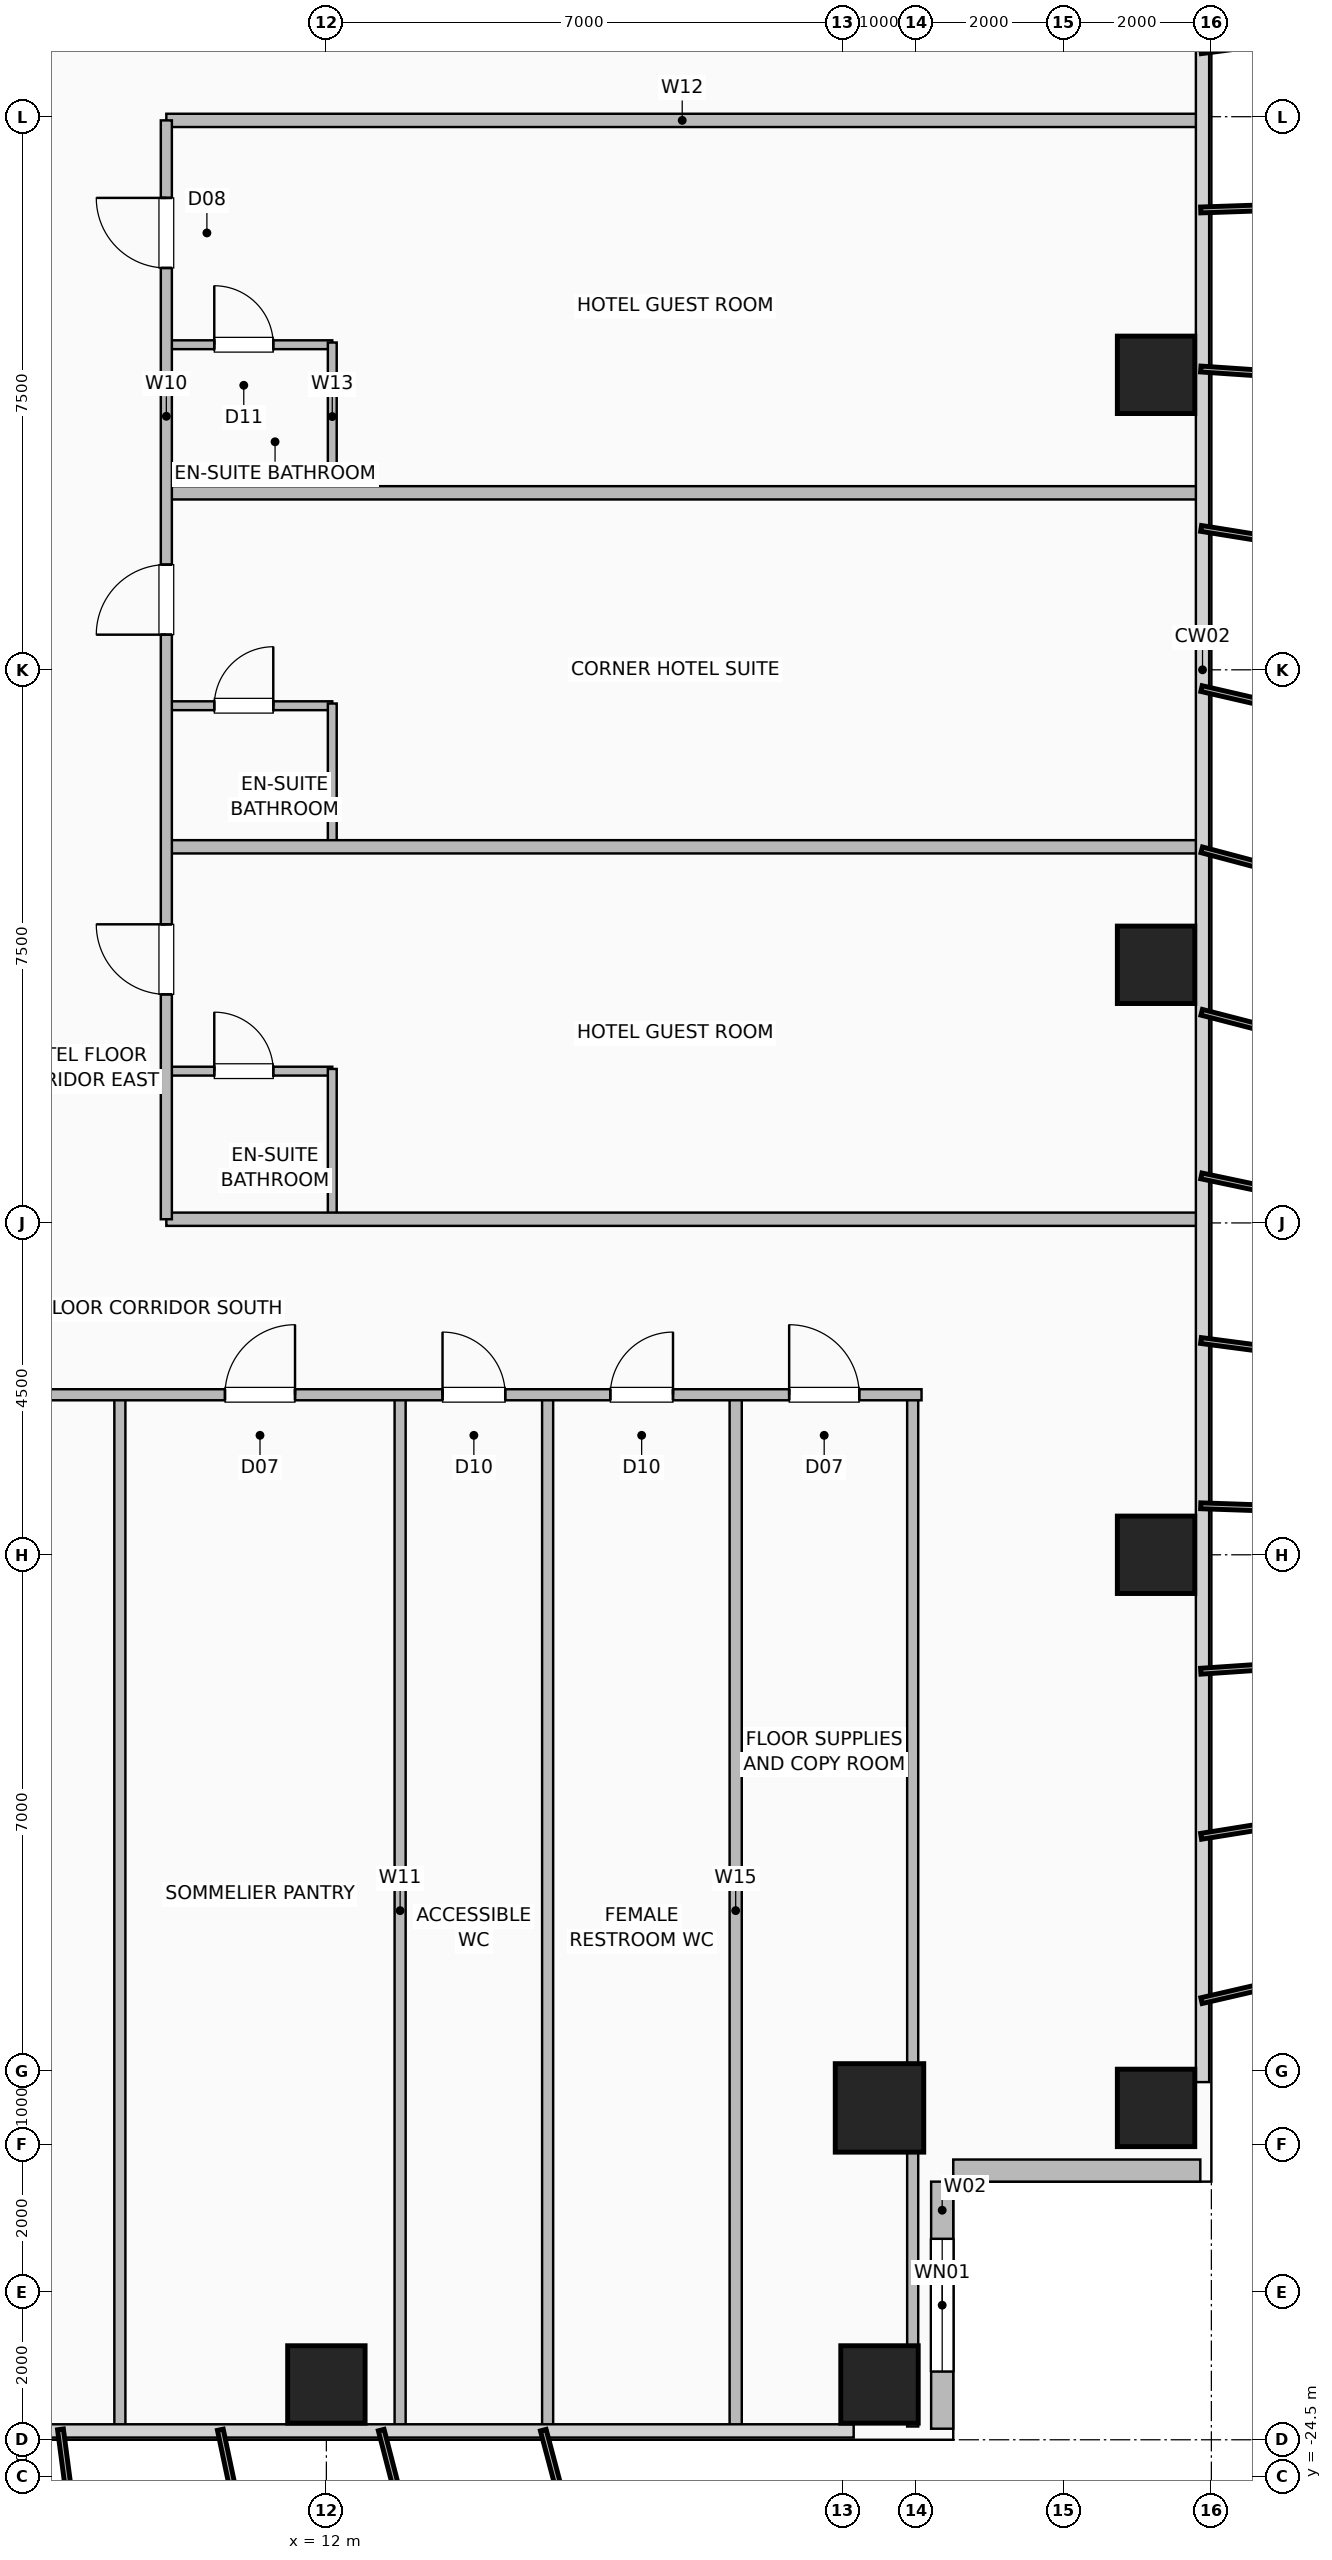
"""IFC4 building model, lengths in metres.
Left out: names, types, materials, properties, quantities, classifications, styles, units other than length and angle.
Written with IfcOpenShell. Run it as: python <this file> out.ifc"""

import sys

from ifc_helpers import new_model, si_unit, direction, frame, frame_2d, origin, origin_2d, place, context, subcontext, project, spatial, rectangle, hollow_rectangle, extrude, element, fill, save


model = new_model("IFC4")
c1 = context("Model", 3, precision=1e-05, world=origin(), true_north=direction((0.0, 1.0)))
c2 = subcontext(c1, "Body", "Model", "MODEL_VIEW")
j1 = project(units=[si_unit("LENGTHUNIT", "METRE"), si_unit("PLANEANGLEUNIT", "RADIAN")], contexts=[c1])
p1 = place(None, origin())
s1 = spatial("IfcSite", under=j1, at=p1, CompositionType="ELEMENT")
p2 = place(p1, origin())
s2 = spatial("IfcBuilding", under=s1, at=p2, CompositionType="ELEMENT")
p3 = place(p2, frame((0.0, 0.0, 69.0)))
s3 = spatial("IfcBuildingStorey", under=s2, at=p3, CompositionType="ELEMENT", Elevation=69.0)
for number, where, z_axis, x_axis in (
    (1, (23.25, -19.5, 0.0), (0.0, 0.0, 1.0), (1.0, 0.0, 0.0)),
    (2, (23.25, -12.0, 0.0), (0.0, 0.0, 1.0), (1.0, 0.0, 0.0)),
    (3, (23.25, -4.0, 0.0), (0.0, 0.0, 1.0), (1.0, 0.0, 0.0)),
    (4, (23.25, 4.0, 0.0), (0.0, 0.0, 1.0), (1.0, 0.0, 0.0)),
    (5, (12.0, -23.25, 0.0), (0.0, 0.0, 1.0), (1.0, 0.0, 0.0)),
    (6, (19.5, -23.25, 0.0), (0.0, 0.0, 1.0), (1.0, 0.0, 0.0)),
):
    element("IfcColumn", number, at=place(p3, frame(where, z_axis=z_axis, x_axis=x_axis)), inside=s3, PredefinedType="COLUMN", context=c2, shape_type="SweptSolid", body=[
        extrude(hollow_rectangle(XDim=1.05, YDim=1.05, WallThickness=0.05, at=origin_2d()), origin(), (0.0, 0.0, 1.0), 3.5),
    ])
p4 = place(p3, frame((19.5, -19.5, 0.0), z_axis=(0.0, 0.0, 1.0), x_axis=(1.0, 0.0, 0.0)))
e7 = element("IfcColumn", 7, at=p4, inside=s3, PredefinedType="COLUMN", context=c2, shape_type="SweptSolid", body=[
    extrude(hollow_rectangle(XDim=1.2, YDim=1.2, WallThickness=0.055, at=origin_2d()), origin(), (0.0, 0.0, 1.0), 3.5),
])
p5 = place(p3, frame((20.35, -23.85, 0.0), z_axis=(0.0, 0.0, 1.0), x_axis=(0.0, 1.0, 0.0)))
e8 = element("IfcWall", 8, at=p5, inside=s3, PredefinedType="SOLIDWALL", context=c2, shape_type="SweptSolid", body=[
    extrude(rectangle(XDim=3.35, YDim=0.3, at=frame_2d((1.675, 0.0))), origin(), (0.0, 0.0, 1.0), 3.25),
])
p6 = place(p5, frame((0.775, 0.0, 0.9)))
e9 = element("IfcOpeningElement", 9, at=p6, cuts=e8, PredefinedType="OPENING", context=c2, shape_type="SweptSolid", body=[
    extrude(rectangle(XDim=1.8, YDim=1.8, at=frame_2d((0.9, 0.9))), frame((0.0, 0.16, 0.0), z_axis=(0.0, -1.0, 0.0), x_axis=(1.0, 0.0, 0.0)), (0.0, 0.0, 1.0), 0.32),
])
p7 = place(p3, frame((23.85, -20.35, 0.0), z_axis=(0.0, 0.0, 1.0), x_axis=(-1.0, 0.0, 0.0)))
e10 = element("IfcWall", 10, at=p7, inside=s3, PredefinedType="SOLIDWALL", context=c2, shape_type="SweptSolid", body=[
    extrude(rectangle(XDim=3.35, YDim=0.3, at=frame_2d((1.675, 0.0))), origin(), (0.0, 0.0, 1.0), 3.25),
])
p8 = place(p3, frame((17.55, -23.82, 0.0), z_axis=(0.0, 0.0, 1.0), x_axis=(0.0, 1.0, 0.0)))
e11 = element("IfcWall", 11, at=p8, inside=s3, PredefinedType="PLUMBINGWALL", context=c2, shape_type="SweptSolid", body=[
    extrude(rectangle(XDim=13.99, YDim=0.165, at=frame_2d((6.995, 0.0))), origin(), (0.0, 0.0, 1.0), 3.25),
])
for number, where, z_axis, x_axis in (
    (12, (9.2, -23.82, 0.0), (0.0, 0.0, 1.0), (0.0, 1.0, 0.0)),
    (13, (13.0, -23.82, 0.0), (0.0, 0.0, 1.0), (0.0, 1.0, 0.0)),
    (14, (15.0, -23.82, 0.0), (0.0, 0.0, 1.0), (0.0, 1.0, 0.0)),
    (15, (19.95, -23.82, 0.0), (0.0, 0.0, 1.0), (0.0, 1.0, 0.0)),
):
    element("IfcWall", number, at=place(p3, frame(where, z_axis=z_axis, x_axis=x_axis)), inside=s3, PredefinedType="PARTITIONING", context=c2, shape_type="SweptSolid", body=[
        extrude(rectangle(XDim=13.99, YDim=0.15, at=frame_2d((6.995, 0.0))), origin(), (0.0, 0.0, 1.0), 3.25),
    ])
p9 = place(p3, frame((-20.07, -9.83, 0.0), z_axis=(0.0, 0.0, 1.0), x_axis=(1.0, 0.0, 0.0)))
e16 = element("IfcWall", 16, at=p9, inside=s3, PredefinedType="PARTITIONING", context=c2, shape_type="SweptSolid", body=[
    extrude(rectangle(XDim=40.14, YDim=0.15, at=frame_2d((20.07, 0.0))), origin(), (0.0, 0.0, 1.0), 3.25),
])
p10 = place(p9, frame((4.445, 0.0, 0.0)))
e17 = element("IfcOpeningElement", 17, at=p10, cuts=e16, PredefinedType="OPENING", context=c2, shape_type="SweptSolid", body=[
    extrude(rectangle(XDim=1.8, YDim=2.08, at=frame_2d((0.9, 1.04))), frame((0.0, 0.085, 0.0), z_axis=(0.0, -1.0, 0.0), x_axis=(1.0, 0.0, 0.0)), (0.0, 0.0, 1.0), 0.17),
])
p11 = place(p9, frame((15.32, 0.0, 0.0)))
e18 = element("IfcOpeningElement", 18, at=p11, cuts=e16, PredefinedType="OPENING", context=c2, shape_type="SweptSolid", body=[
    extrude(rectangle(XDim=1.8, YDim=2.08, at=frame_2d((0.9, 1.04))), frame((0.0, 0.085, 0.0), z_axis=(0.0, -1.0, 0.0), x_axis=(1.0, 0.0, 0.0)), (0.0, 0.0, 1.0), 0.17),
])
p12 = place(p9, frame((25.095, 0.0, 0.0)))
e19 = element("IfcOpeningElement", 19, at=p12, cuts=e16, PredefinedType="OPENING", context=c2, shape_type="SweptSolid", body=[
    extrude(rectangle(XDim=0.95, YDim=2.06, at=frame_2d((0.475, 1.03))), frame((0.0, 0.085, 0.0), z_axis=(0.0, -1.0, 0.0), x_axis=(1.0, 0.0, 0.0)), (0.0, 0.0, 1.0), 0.17),
])
p13 = place(p9, frame((30.695, 0.0, 0.0)))
e20 = element("IfcOpeningElement", 20, at=p13, cuts=e16, PredefinedType="OPENING", context=c2, shape_type="SweptSolid", body=[
    extrude(rectangle(XDim=0.95, YDim=2.06, at=frame_2d((0.475, 1.03))), frame((0.0, 0.085, 0.0), z_axis=(0.0, -1.0, 0.0), x_axis=(1.0, 0.0, 0.0)), (0.0, 0.0, 1.0), 0.17),
])
p14 = place(p9, frame((33.645, 0.0, 0.0)))
e21 = element("IfcOpeningElement", 21, at=p14, cuts=e16, PredefinedType="OPENING", context=c2, shape_type="SweptSolid", body=[
    extrude(rectangle(XDim=0.85, YDim=2.05, at=frame_2d((0.425, 1.025))), frame((0.0, 0.085, 0.0), z_axis=(0.0, -1.0, 0.0), x_axis=(1.0, 0.0, 0.0)), (0.0, 0.0, 1.0), 0.17),
])
p15 = place(p9, frame((35.92, 0.0, 0.0)))
e22 = element("IfcOpeningElement", 22, at=p15, cuts=e16, PredefinedType="OPENING", context=c2, shape_type="SweptSolid", body=[
    extrude(rectangle(XDim=0.85, YDim=2.05, at=frame_2d((0.425, 1.025))), frame((0.0, 0.085, 0.0), z_axis=(0.0, -1.0, 0.0), x_axis=(1.0, 0.0, 0.0)), (0.0, 0.0, 1.0), 0.17),
])
p16 = place(p9, frame((38.345, 0.0, 0.0)))
e23 = element("IfcOpeningElement", 23, at=p16, cuts=e16, PredefinedType="OPENING", context=c2, shape_type="SweptSolid", body=[
    extrude(rectangle(XDim=0.95, YDim=2.06, at=frame_2d((0.475, 1.03))), frame((0.0, 0.085, 0.0), z_axis=(0.0, -1.0, 0.0), x_axis=(1.0, 0.0, 0.0)), (0.0, 0.0, 1.0), 0.17),
])
p17 = place(p3, frame((9.83, -5.442, 0.0), z_axis=(0.0, 0.0, 1.0), x_axis=(1.0, 0.0, 0.0)))
e24 = element("IfcWall", 24, at=p17, inside=s3, PredefinedType="PLUMBINGWALL", context=c2, shape_type="SweptSolid", body=[
    extrude(rectangle(XDim=2.25, YDim=0.12, at=frame_2d((1.125, 0.0))), origin(), (0.0, 0.0, 1.0), 3.25),
])
p18 = place(p17, frame((0.65, 0.0, 0.0)))
e25 = element("IfcOpeningElement", 25, at=p18, cuts=e24, PredefinedType="OPENING", context=c2, shape_type="SweptSolid", body=[
    extrude(rectangle(XDim=0.8, YDim=2.05, at=frame_2d((0.4, 1.025))), frame((0.0, 0.07, 0.0), z_axis=(0.0, -1.0, 0.0), x_axis=(1.0, 0.0, 0.0)), (0.0, 0.0, 1.0), 0.14),
])
p19 = place(p3, frame((12.08, -7.42, 0.0), z_axis=(0.0, 0.0, 1.0), x_axis=(0.0, 1.0, 0.0)))
e26 = element("IfcWall", 26, at=p19, inside=s3, PredefinedType="PLUMBINGWALL", context=c2, shape_type="SweptSolid", body=[
    extrude(rectangle(XDim=2.008, YDim=0.12, at=frame_2d((1.004, 0.0))), origin(), (0.0, 0.0, 1.0), 3.25),
])
p20 = place(p3, frame((9.83, -0.487, 0.0), z_axis=(0.0, 0.0, 1.0), x_axis=(1.0, 0.0, 0.0)))
e27 = element("IfcWall", 27, at=p20, inside=s3, PredefinedType="PLUMBINGWALL", context=c2, shape_type="SweptSolid", body=[
    extrude(rectangle(XDim=2.25, YDim=0.12, at=frame_2d((1.125, 0.0))), origin(), (0.0, 0.0, 1.0), 3.25),
])
p21 = place(p20, frame((0.65, 0.0, 0.0)))
e28 = element("IfcOpeningElement", 28, at=p21, cuts=e27, PredefinedType="OPENING", context=c2, shape_type="SweptSolid", body=[
    extrude(rectangle(XDim=0.8, YDim=2.05, at=frame_2d((0.4, 1.025))), frame((0.0, 0.07, 0.0), z_axis=(0.0, -1.0, 0.0), x_axis=(1.0, 0.0, 0.0)), (0.0, 0.0, 1.0), 0.14),
])
p22 = place(p3, frame((12.08, -2.37, 0.0), z_axis=(0.0, 0.0, 1.0), x_axis=(0.0, 1.0, 0.0)))
e29 = element("IfcWall", 29, at=p22, inside=s3, PredefinedType="PLUMBINGWALL", context=c2, shape_type="SweptSolid", body=[
    extrude(rectangle(XDim=1.913, YDim=0.12, at=frame_2d((0.957, 0.0))), origin(), (0.0, 0.0, 1.0), 3.25),
])
p23 = place(p3, frame((9.83, 4.408, 0.0), z_axis=(0.0, 0.0, 1.0), x_axis=(1.0, 0.0, 0.0)))
e30 = element("IfcWall", 30, at=p23, inside=s3, PredefinedType="PLUMBINGWALL", context=c2, shape_type="SweptSolid", body=[
    extrude(rectangle(XDim=2.25, YDim=0.12, at=frame_2d((1.125, 0.0))), origin(), (0.0, 0.0, 1.0), 3.25),
])
p24 = place(p23, frame((0.65, 0.0, 0.0)))
e31 = element("IfcOpeningElement", 31, at=p24, cuts=e30, PredefinedType="OPENING", context=c2, shape_type="SweptSolid", body=[
    extrude(rectangle(XDim=0.8, YDim=2.05, at=frame_2d((0.4, 1.025))), frame((0.0, 0.07, 0.0), z_axis=(0.0, -1.0, 0.0), x_axis=(1.0, 0.0, 0.0)), (0.0, 0.0, 1.0), 0.14),
])
p25 = place(p3, frame((12.08, 2.43, 0.0), z_axis=(0.0, 0.0, 1.0), x_axis=(0.0, 1.0, 0.0)))
e32 = element("IfcWall", 32, at=p25, inside=s3, PredefinedType="PLUMBINGWALL", context=c2, shape_type="SweptSolid", body=[
    extrude(rectangle(XDim=2.008, YDim=0.12, at=frame_2d((1.004, 0.0))), origin(), (0.0, 0.0, 1.0), 3.25),
])
for number, where, z_axis, x_axis in (
    (33, (9.83, -7.45, 0.0), (0.0, 0.0, 1.0), (1.0, 0.0, 0.0)),
    (34, (9.83, -2.4, 0.0), (0.0, 0.0, 1.0), (1.0, 0.0, 0.0)),
    (35, (9.83, 2.4, 0.0), (0.0, 0.0, 1.0), (1.0, 0.0, 0.0)),
    (36, (9.83, 7.45, 0.0), (0.0, 0.0, 1.0), (1.0, 0.0, 0.0)),
):
    element("IfcWall", number, at=place(p3, frame(where, z_axis=z_axis, x_axis=x_axis)), inside=s3, PredefinedType="PARTITIONING", context=c2, shape_type="SweptSolid", body=[
        extrude(rectangle(XDim=13.99, YDim=0.18, at=frame_2d((6.995, 0.0))), origin(), (0.0, 0.0, 1.0), 3.25),
    ])
p26 = place(p3, frame((9.83, -7.45, 0.0), z_axis=(0.0, 0.0, 1.0), x_axis=(0.0, 1.0, 0.0)))
e37 = element("IfcWall", 37, at=p26, inside=s3, PredefinedType="PARTITIONING", context=c2, shape_type="SweptSolid", body=[
    extrude(rectangle(XDim=14.9, YDim=0.15, at=frame_2d((7.45, 0.0))), origin(), (0.0, 0.0, 1.0), 3.25),
])
p27 = place(p26, frame((3.049, 0.0, 0.0)))
e38 = element("IfcOpeningElement", 38, at=p27, cuts=e37, PredefinedType="OPENING", context=c2, shape_type="SweptSolid", body=[
    extrude(rectangle(XDim=0.95, YDim=2.08, at=frame_2d((0.475, 1.04))), frame((0.0, 0.085, 0.0), z_axis=(0.0, -1.0, 0.0), x_axis=(1.0, 0.0, 0.0)), (0.0, 0.0, 1.0), 0.17),
])
p28 = place(p26, frame((7.927, 0.0, 0.0)))
e39 = element("IfcOpeningElement", 39, at=p28, cuts=e37, PredefinedType="OPENING", context=c2, shape_type="SweptSolid", body=[
    extrude(rectangle(XDim=0.95, YDim=2.08, at=frame_2d((0.475, 1.04))), frame((0.0, 0.085, 0.0), z_axis=(0.0, -1.0, 0.0), x_axis=(1.0, 0.0, 0.0)), (0.0, 0.0, 1.0), 0.17),
])
p29 = place(p26, frame((12.899, 0.0, 0.0)))
e40 = element("IfcOpeningElement", 40, at=p29, cuts=e37, PredefinedType="OPENING", context=c2, shape_type="SweptSolid", body=[
    extrude(rectangle(XDim=0.95, YDim=2.08, at=frame_2d((0.475, 1.04))), frame((0.0, 0.085, 0.0), z_axis=(0.0, -1.0, 0.0), x_axis=(1.0, 0.0, 0.0)), (0.0, 0.0, 1.0), 0.17),
])
p30 = place(p6, origin())
e41 = element("IfcWindow", 41, at=p30, inside=s3, PartitioningType="SINGLE_PANEL", PredefinedType="WINDOW", context=c2, shape_type="SweptSolid", body=[
    extrude(rectangle(XDim=1.8, YDim=1.8, at=frame_2d((0.9, 0.9))), frame((0.0, 0.03, 0.0), z_axis=(0.0, -1.0, 0.0), x_axis=(1.0, 0.0, 0.0)), (0.0, 0.0, 1.0), 0.06),
])
fill(e9, e41)
p31 = place(p13, origin())
e42 = element("IfcDoor", 42, at=p31, inside=s3, OperationType="SINGLE_SWING_RIGHT", PredefinedType="DOOR", context=c2, shape_type="SweptSolid", body=[
    extrude(rectangle(XDim=0.95, YDim=2.06, at=frame_2d((0.475, 1.03))), frame((0.0, 0.025, 0.0), z_axis=(0.0, -1.0, 0.0), x_axis=(1.0, 0.0, 0.0)), (0.0, 0.0, 1.0), 0.05),
])
fill(e20, e42)
p32 = place(p14, origin())
e43 = element("IfcDoor", 43, at=p32, inside=s3, OperationType="SINGLE_SWING_LEFT", PredefinedType="DOOR", context=c2, shape_type="SweptSolid", body=[
    extrude(rectangle(XDim=0.85, YDim=2.05, at=frame_2d((0.425, 1.025))), frame((0.0, 0.025, 0.0), z_axis=(0.0, -1.0, 0.0), x_axis=(1.0, 0.0, 0.0)), (0.0, 0.0, 1.0), 0.05),
])
fill(e21, e43)
p33 = place(p15, origin())
e44 = element("IfcDoor", 44, at=p33, inside=s3, OperationType="SINGLE_SWING_RIGHT", PredefinedType="DOOR", context=c2, shape_type="SweptSolid", body=[
    extrude(rectangle(XDim=0.85, YDim=2.05, at=frame_2d((0.425, 1.025))), frame((0.0, 0.025, 0.0), z_axis=(0.0, -1.0, 0.0), x_axis=(1.0, 0.0, 0.0)), (0.0, 0.0, 1.0), 0.05),
])
fill(e22, e44)
p34 = place(p16, origin())
e45 = element("IfcDoor", 45, at=p34, inside=s3, OperationType="SINGLE_SWING_LEFT", PredefinedType="DOOR", context=c2, shape_type="SweptSolid", body=[
    extrude(rectangle(XDim=0.95, YDim=2.06, at=frame_2d((0.475, 1.03))), frame((0.0, 0.025, 0.0), z_axis=(0.0, -1.0, 0.0), x_axis=(1.0, 0.0, 0.0)), (0.0, 0.0, 1.0), 0.05),
])
fill(e23, e45)
p35 = place(p18, origin())
e46 = element("IfcDoor", 46, at=p35, inside=s3, OperationType="SINGLE_SWING_LEFT", PredefinedType="DOOR", context=c2, shape_type="SweptSolid", body=[
    extrude(rectangle(XDim=0.8, YDim=2.05, at=frame_2d((0.4, 1.025))), frame((0.0, 0.025, 0.0), z_axis=(0.0, -1.0, 0.0), x_axis=(1.0, 0.0, 0.0)), (0.0, 0.0, 1.0), 0.05),
])
fill(e25, e46)
p36 = place(p21, origin())
e47 = element("IfcDoor", 47, at=p36, inside=s3, OperationType="SINGLE_SWING_RIGHT", PredefinedType="DOOR", context=c2, shape_type="SweptSolid", body=[
    extrude(rectangle(XDim=0.8, YDim=2.05, at=frame_2d((0.4, 1.025))), frame((0.0, 0.025, 0.0), z_axis=(0.0, -1.0, 0.0), x_axis=(1.0, 0.0, 0.0)), (0.0, 0.0, 1.0), 0.05),
])
fill(e28, e47)
p37 = place(p24, origin())
e48 = element("IfcDoor", 48, at=p37, inside=s3, OperationType="SINGLE_SWING_LEFT", PredefinedType="DOOR", context=c2, shape_type="SweptSolid", body=[
    extrude(rectangle(XDim=0.8, YDim=2.05, at=frame_2d((0.4, 1.025))), frame((0.0, 0.025, 0.0), z_axis=(0.0, -1.0, 0.0), x_axis=(1.0, 0.0, 0.0)), (0.0, 0.0, 1.0), 0.05),
])
fill(e31, e48)
p38 = place(p27, origin())
e49 = element("IfcDoor", 49, at=p38, inside=s3, OperationType="SINGLE_SWING_RIGHT", PredefinedType="DOOR", context=c2, shape_type="SweptSolid", body=[
    extrude(rectangle(XDim=0.95, YDim=2.08, at=frame_2d((0.475, 1.04))), frame((0.0, 0.025, 0.0), z_axis=(0.0, -1.0, 0.0), x_axis=(1.0, 0.0, 0.0)), (0.0, 0.0, 1.0), 0.05),
])
fill(e38, e49)
p39 = place(p28, origin())
e50 = element("IfcDoor", 50, at=p39, inside=s3, OperationType="SINGLE_SWING_LEFT", PredefinedType="DOOR", context=c2, shape_type="SweptSolid", body=[
    extrude(rectangle(XDim=0.95, YDim=2.08, at=frame_2d((0.475, 1.04))), frame((0.0, 0.025, 0.0), z_axis=(0.0, -1.0, 0.0), x_axis=(1.0, 0.0, 0.0)), (0.0, 0.0, 1.0), 0.05),
])
fill(e39, e50)
p40 = place(p29, origin())
e51 = element("IfcDoor", 51, at=p40, inside=s3, OperationType="SINGLE_SWING_RIGHT", PredefinedType="DOOR", context=c2, shape_type="SweptSolid", body=[
    extrude(rectangle(XDim=0.95, YDim=2.08, at=frame_2d((0.475, 1.04))), frame((0.0, 0.025, 0.0), z_axis=(0.0, -1.0, 0.0), x_axis=(1.0, 0.0, 0.0)), (0.0, 0.0, 1.0), 0.05),
])
fill(e40, e51)
save(model, sys.argv[1])
